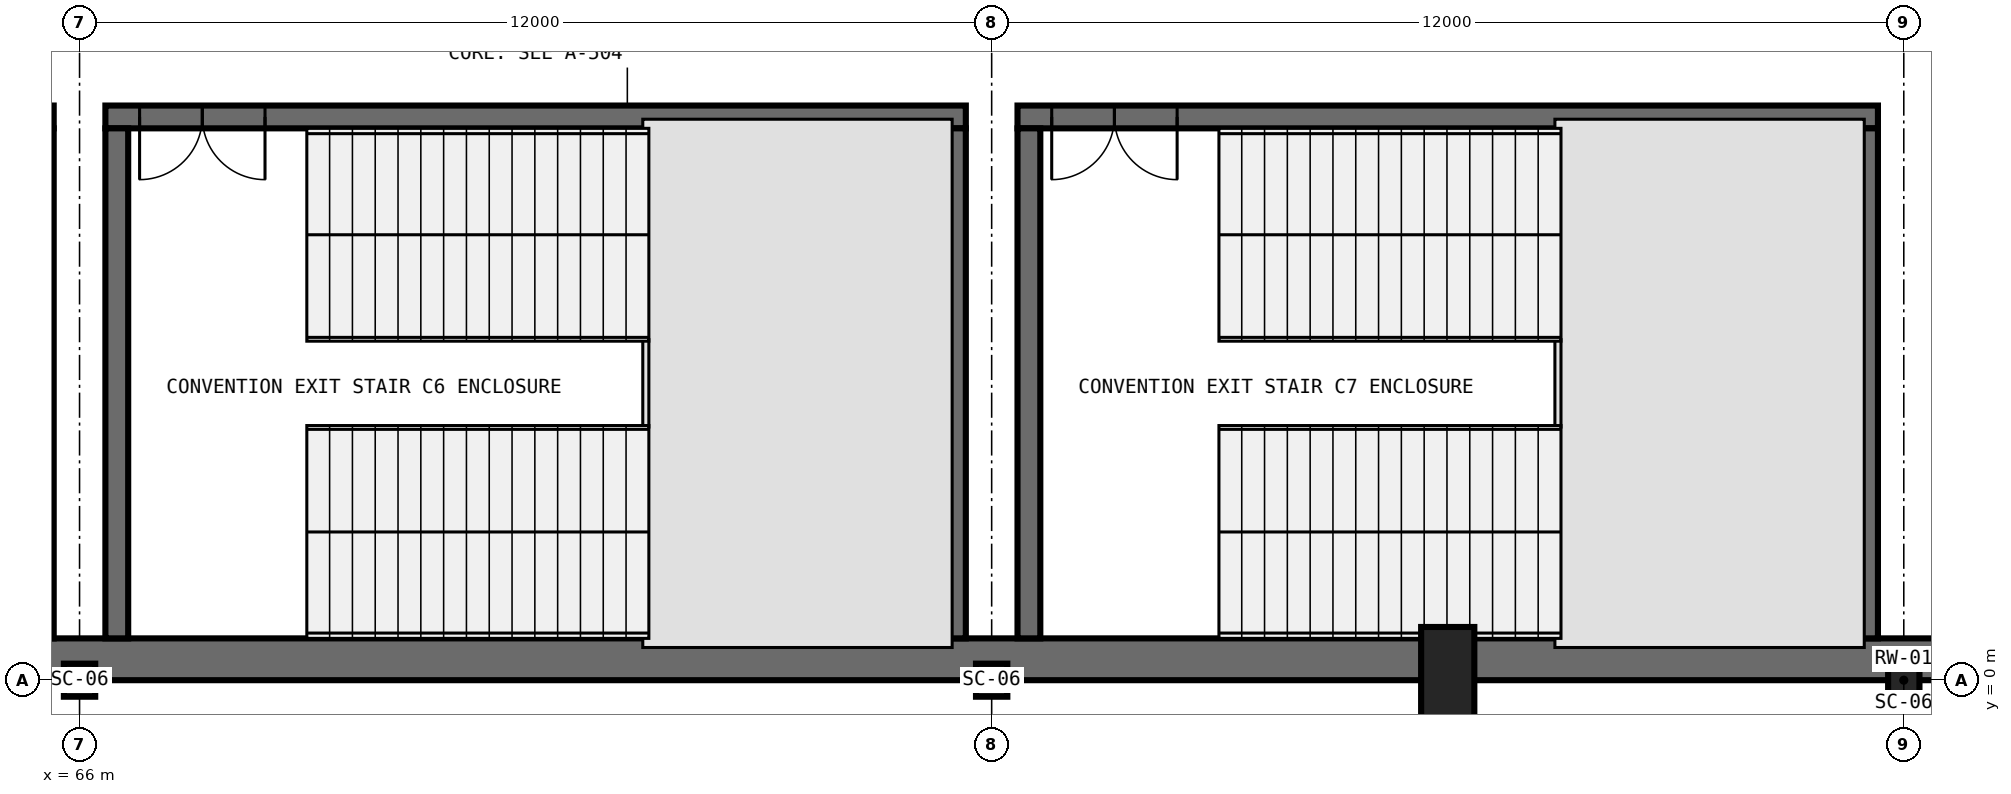
"""IFC4 building model, lengths in metres.
Left out: names, types, materials, properties, quantities, classifications, styles, units other than length and angle.
Written with IfcOpenShell. Run it as: python <this file> out.ifc"""

import sys

from ifc_helpers import new_model, si_unit, direction, frame, frame_2d, origin, origin_2d, place, context, subcontext, project, spatial, rectangle, i_section, extrude, element, fill, save


model = new_model("IFC4")
c1 = context("Model", 3, precision=1e-05, world=origin(), true_north=direction((0.0, 1.0)))
c2 = subcontext(c1, "Body", "Model", "MODEL_VIEW")
j1 = project(units=[si_unit("LENGTHUNIT", "METRE"), si_unit("PLANEANGLEUNIT", "RADIAN")], contexts=[c1])
p1 = place(None, origin())
s1 = spatial("IfcSite", under=j1, at=p1, CompositionType="ELEMENT")
p2 = place(p1, origin())
s2 = spatial("IfcBuilding", under=s1, at=p2, CompositionType="ELEMENT")
p3 = place(p2, frame((0.0, 0.0, -5.4)))
s3 = spatial("IfcBuildingStorey", under=s2, at=p3, CompositionType="ELEMENT", Elevation=-5.4)
for number, where, z_axis, x_axis in (
    (1, (66.0, 0.0, 0.0), (0.0, 0.0, 1.0), (1.0, 0.0, 0.0)),
    (2, (78.0, 0.0, 0.0), (0.0, 0.0, 1.0), (1.0, 0.0, 0.0)),
    (3, (90.0, 0.0, 0.0), (0.0, 0.0, 1.0), (1.0, 0.0, 0.0)),
):
    element("IfcColumn", number, at=place(p3, frame(where, z_axis=z_axis, x_axis=x_axis)), inside=s3, PredefinedType="COLUMN", context=c2, shape_type="SweptSolid", body=[
        extrude(i_section(OverallWidth=0.412, OverallDepth=0.435, WebThickness=0.036, FlangeThickness=0.057, FilletRadius=0.031, at=origin_2d()), origin(), (0.0, 0.0, 1.0), 5.4),
    ])
p4 = place(p3, frame((84.0, 0.0, 0.0), z_axis=(0.0, 0.0, 1.0), x_axis=(1.0, 0.0, 0.0)))
e4 = element("IfcColumn", 4, at=p4, inside=s3, PredefinedType="PILASTER", context=c2, shape_type="SweptSolid", body=[
    extrude(rectangle(XDim=0.7, YDim=1.4, at=origin_2d()), origin(), (0.0, 0.0, 1.0), 5.4),
])
p5 = place(p3, frame((0.0, 0.275, 0.0), z_axis=(0.0, 0.0, 1.0), x_axis=(1.0, 0.0, 0.0)))
e5 = element("IfcWall", 5, at=p5, inside=s3, PredefinedType="SOLIDWALL", context=c2, shape_type="SweptSolid", body=[
    extrude(rectangle(XDim=174.0, YDim=0.55, at=frame_2d((87.0, 0.0))), origin(), (0.0, 0.0, 1.0), 5.02),
])
p6 = place(p3, frame((65.66, 7.41, 0.0), z_axis=(0.0, 0.0, 1.0), x_axis=(-1.0, 0.0, 0.0)))
e6 = element("IfcWall", 6, at=p6, inside=s3, PredefinedType="SHEAR", context=c2, shape_type="SweptSolid", body=[
    extrude(rectangle(XDim=11.32, YDim=0.3, at=frame_2d((5.66, 0.0))), origin(), (0.0, 0.0, 1.0), 5.4),
])
p7 = place(p6, frame((9.22, 0.0, 0.0)))
e7 = element("IfcOpeningElement", 7, at=p7, cuts=e6, PredefinedType="OPENING", context=c2, shape_type="SweptSolid", body=[
    extrude(rectangle(XDim=1.65, YDim=2.25, at=frame_2d((0.825, 1.125))), frame((0.0, 0.165, 0.0), z_axis=(0.0, -1.0, 0.0), x_axis=(1.0, 0.0, 0.0)), (0.0, 0.0, 1.0), 0.33),
])
p8 = place(p3, frame((65.51, 0.55, 0.0), z_axis=(0.0, 0.0, 1.0), x_axis=(0.0, 1.0, 0.0)))
e8 = element("IfcWall", 8, at=p8, inside=s3, PredefinedType="SHEAR", context=c2, shape_type="SweptSolid", body=[
    extrude(rectangle(XDim=6.71, YDim=0.3, at=frame_2d((3.355, 0.0))), origin(), (0.0, 0.0, 1.0), 5.4),
])
p9 = place(p3, frame((77.66, 7.41, 0.0), z_axis=(0.0, 0.0, 1.0), x_axis=(-1.0, 0.0, 0.0)))
e9 = element("IfcWall", 9, at=p9, inside=s3, PredefinedType="SHEAR", context=c2, shape_type="SweptSolid", body=[
    extrude(rectangle(XDim=11.32, YDim=0.3, at=frame_2d((5.66, 0.0))), origin(), (0.0, 0.0, 1.0), 5.4),
])
p10 = place(p9, frame((9.22, 0.0, 0.0)))
e10 = element("IfcOpeningElement", 10, at=p10, cuts=e9, PredefinedType="OPENING", context=c2, shape_type="SweptSolid", body=[
    extrude(rectangle(XDim=1.65, YDim=2.25, at=frame_2d((0.825, 1.125))), frame((0.0, 0.165, 0.0), z_axis=(0.0, -1.0, 0.0), x_axis=(1.0, 0.0, 0.0)), (0.0, 0.0, 1.0), 0.33),
])
for number, where, z_axis, x_axis in (
    (11, (66.49, 7.26, 0.0), (0.0, 0.0, 1.0), (0.0, -1.0, 0.0)),
    (12, (77.51, 0.55, 0.0), (0.0, 0.0, 1.0), (0.0, 1.0, 0.0)),
):
    element("IfcWall", number, at=place(p3, frame(where, z_axis=z_axis, x_axis=x_axis)), inside=s3, PredefinedType="SHEAR", context=c2, shape_type="SweptSolid", body=[
        extrude(rectangle(XDim=6.71, YDim=0.3, at=frame_2d((3.355, 0.0))), origin(), (0.0, 0.0, 1.0), 5.4),
    ])
p11 = place(p3, frame((89.66, 7.41, 0.0), z_axis=(0.0, 0.0, 1.0), x_axis=(-1.0, 0.0, 0.0)))
e13 = element("IfcWall", 13, at=p11, inside=s3, PredefinedType="SHEAR", context=c2, shape_type="SweptSolid", body=[
    extrude(rectangle(XDim=11.32, YDim=0.3, at=frame_2d((5.66, 0.0))), origin(), (0.0, 0.0, 1.0), 5.4),
])
p12 = place(p11, frame((9.22, 0.0, 0.0)))
e14 = element("IfcOpeningElement", 14, at=p12, cuts=e13, PredefinedType="OPENING", context=c2, shape_type="SweptSolid", body=[
    extrude(rectangle(XDim=1.65, YDim=2.25, at=frame_2d((0.825, 1.125))), frame((0.0, 0.165, 0.0), z_axis=(0.0, -1.0, 0.0), x_axis=(1.0, 0.0, 0.0)), (0.0, 0.0, 1.0), 0.33),
])
for number, where, z_axis, x_axis in (
    (15, (78.49, 7.26, 0.0), (0.0, 0.0, 1.0), (0.0, -1.0, 0.0)),
    (16, (89.51, 0.55, 0.0), (0.0, 0.0, 1.0), (0.0, 1.0, 0.0)),
):
    element("IfcWall", number, at=place(p3, frame(where, z_axis=z_axis, x_axis=x_axis)), inside=s3, PredefinedType="SHEAR", context=c2, shape_type="SweptSolid", body=[
        extrude(rectangle(XDim=6.71, YDim=0.3, at=frame_2d((3.355, 0.0))), origin(), (0.0, 0.0, 1.0), 5.4),
    ])
p13 = place(p10, origin())
e17 = element("IfcDoor", 17, at=p13, inside=s3, OperationType="DOUBLE_DOOR_SINGLE_SWING", PredefinedType="DOOR", context=c2, shape_type="SweptSolid", body=[
    extrude(rectangle(XDim=1.65, YDim=2.25, at=frame_2d((0.825, 1.125))), frame((0.0, 0.025, 0.0), z_axis=(0.0, -1.0, 0.0), x_axis=(1.0, 0.0, 0.0)), (0.0, 0.0, 1.0), 0.05),
])
fill(e10, e17)
p14 = place(p12, origin())
e18 = element("IfcDoor", 18, at=p14, inside=s3, OperationType="DOUBLE_DOOR_SINGLE_SWING", PredefinedType="DOOR", context=c2, shape_type="SweptSolid", body=[
    extrude(rectangle(XDim=1.65, YDim=2.25, at=frame_2d((0.825, 1.125))), frame((0.0, 0.025, 0.0), z_axis=(0.0, -1.0, 0.0), x_axis=(1.0, 0.0, 0.0)), (0.0, 0.0, 1.0), 0.05),
])
fill(e14, e18)
save(model, sys.argv[1])
